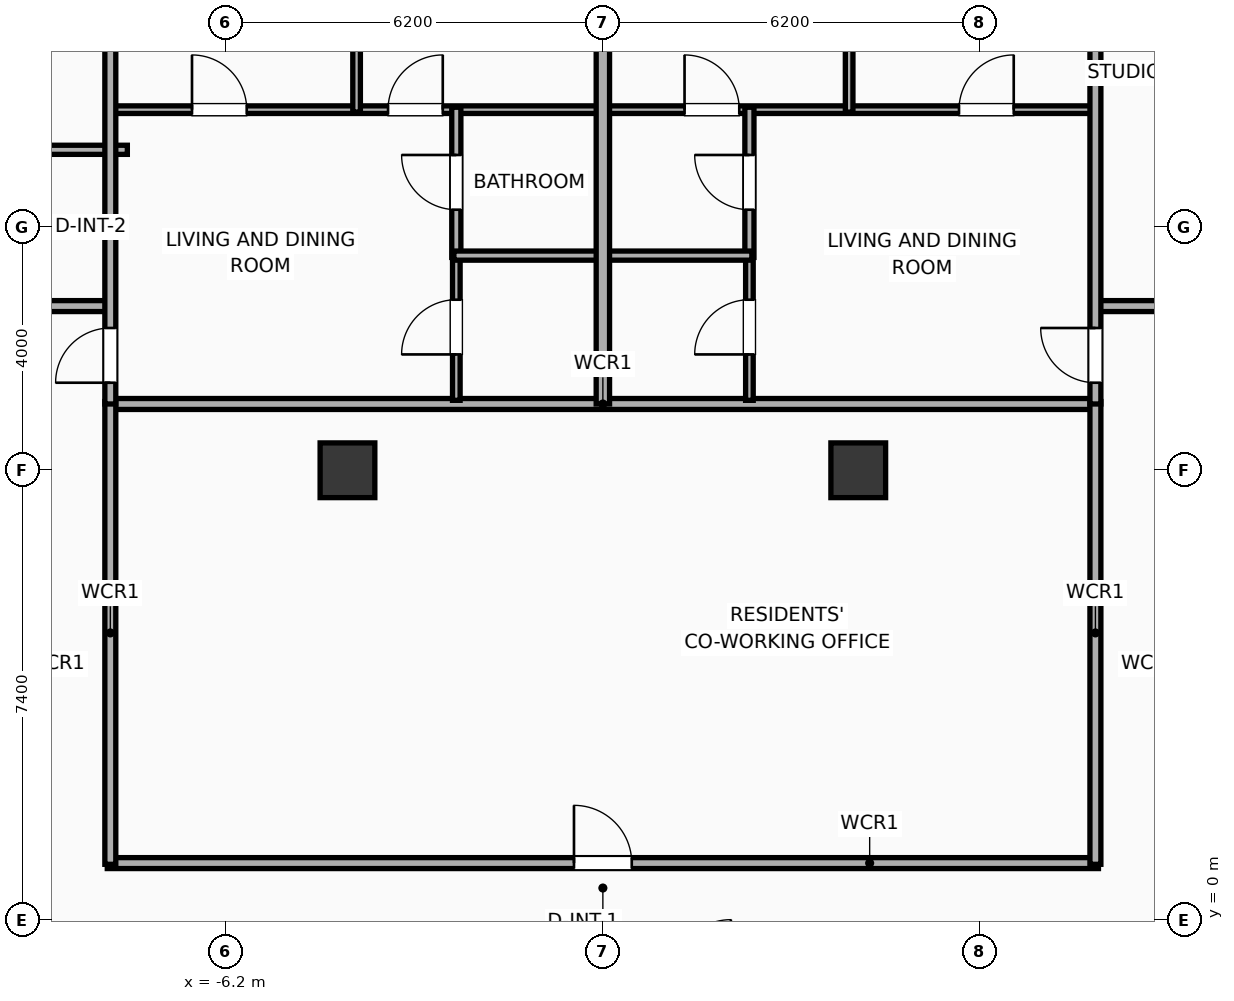
"""IFC4 building model, lengths in metres.
Left out: names, types, materials, properties, quantities, classifications, styles, units other than length and angle.
Written with IfcOpenShell. Run it as: python <this file> out.ifc"""

import sys

from ifc_helpers import new_model, si_unit, direction, frame, frame_2d, origin, origin_2d, place, context, subcontext, project, spatial, rectangle, extrude, element, fill, save


model = new_model("IFC4")
c1 = context("Model", 3, precision=1e-05, world=origin(), true_north=direction((0.0, 1.0)))
c2 = subcontext(c1, "Body", "Model", "MODEL_VIEW")
j1 = project(units=[si_unit("LENGTHUNIT", "METRE"), si_unit("PLANEANGLEUNIT", "RADIAN")], contexts=[c1])
p1 = place(None, origin())
s1 = spatial("IfcSite", under=j1, at=p1, CompositionType="ELEMENT")
p2 = place(p1, origin())
s2 = spatial("IfcBuilding", under=s1, at=p2, CompositionType="ELEMENT")
p3 = place(p2, frame((0.0, 0.0, 200.2)))
s3 = spatial("IfcBuildingStorey", under=s2, at=p3, CompositionType="ELEMENT", Elevation=200.2)
for number, where, z_axis, x_axis in (
    (1, (-4.2, 7.4, 0.0), (0.0, 0.0, 1.0), (1.0, 0.0, 0.0)),
    (2, (4.2, 7.4, 0.0), (0.0, 0.0, 1.0), (1.0, 0.0, 0.0)),
):
    element("IfcColumn", number, at=place(p3, frame(where, z_axis=z_axis, x_axis=x_axis)), inside=s3, PredefinedType="COLUMN", context=c2, shape_type="SweptSolid", body=[
        extrude(rectangle(XDim=0.9, YDim=0.9, at=origin_2d()), origin(), (0.0, 0.0, 1.0), 3.9),
    ])
p4 = place(p3, frame((-8.15, 8.49, 0.0), z_axis=(0.0, 0.0, 1.0), x_axis=(1.0, 0.0, 0.0)))
e3 = element("IfcWall", 3, at=p4, inside=s3, PredefinedType="PARTITIONING", context=c2, shape_type="SweptSolid", body=[
    extrude(rectangle(XDim=16.3, YDim=0.18, at=frame_2d((8.15, 0.0))), origin(), (0.0, 0.0, 1.0), 3.65),
])
p5 = place(p3, frame((-8.15, 0.94, 0.0), z_axis=(0.0, 0.0, 1.0), x_axis=(1.0, 0.0, 0.0)))
e4 = element("IfcWall", 4, at=p5, inside=s3, PredefinedType="PARTITIONING", context=c2, shape_type="SweptSolid", body=[
    extrude(rectangle(XDim=16.3, YDim=0.18, at=frame_2d((8.15, 0.0))), origin(), (0.0, 0.0, 1.0), 3.65),
])
p6 = place(p5, frame((7.675, 0.0, 0.0)))
e5 = element("IfcOpeningElement", 5, at=p6, cuts=e4, PredefinedType="OPENING", context=c2, shape_type="SweptSolid", body=[
    extrude(rectangle(XDim=0.95, YDim=2.05, at=frame_2d((0.475, 1.025))), frame((0.0, 0.1, 0.0), z_axis=(0.0, -1.0, 0.0), x_axis=(1.0, 0.0, 0.0)), (0.0, 0.0, 1.0), 0.2),
])
for number, where, z_axis, x_axis in (
    (6, (-8.1, 0.92, 0.0), (0.0, 0.0, 1.0), (0.0, 1.0, 0.0)),
    (7, (8.1, 0.92, 0.0), (0.0, 0.0, 1.0), (0.0, 1.0, 0.0)),
):
    element("IfcWall", number, at=place(p3, frame(where, z_axis=z_axis, x_axis=x_axis)), inside=s3, PredefinedType="PARTITIONING", context=c2, shape_type="SweptSolid", body=[
        extrude(rectangle(XDim=7.61, YDim=0.18, at=frame_2d((3.805, 0.0))), origin(), (0.0, 0.0, 1.0), 3.65),
    ])
p7 = place(p3, frame((-10.084, 12.67, 0.0), z_axis=(0.0, 0.0, 1.0), x_axis=(1.0, 0.0, 0.0)))
e8 = element("IfcWall", 8, at=p7, inside=s3, PredefinedType="PLUMBINGWALL", context=c2, shape_type="SweptSolid", body=[
    extrude(rectangle(XDim=2.264, YDim=0.15, at=frame_2d((1.132, 0.0))), origin(), (0.0, 0.0, 1.0), 3.65),
])
p8 = place(p3, frame((-19.5, 10.1, 0.0), z_axis=(0.0, 0.0, 1.0), x_axis=(1.0, 0.0, 0.0)))
e9 = element("IfcWall", 9, at=p8, inside=s3, PredefinedType="PARTITIONING", context=c2, shape_type="SweptSolid", body=[
    extrude(rectangle(XDim=11.42, YDim=0.18, at=frame_2d((5.71, 0.0))), origin(), (0.0, 0.0, 1.0), 3.65),
])
p9 = place(p8, frame((3.464, 0.0, 0.0)))
e10 = element("IfcOpeningElement", 10, at=p9, cuts=e9, PredefinedType="OPENING", context=c2, shape_type="SweptSolid", body=[
    extrude(rectangle(XDim=1.15, YDim=2.05, at=frame_2d((0.575, 1.025))), frame((0.0, 0.1, 0.0), z_axis=(0.0, -1.0, 0.0), x_axis=(1.0, 0.0, 0.0)), (0.0, 0.0, 1.0), 0.2),
])
p10 = place(p8, frame((8.323, 0.0, 0.0)))
e11 = element("IfcOpeningElement", 11, at=p10, cuts=e9, PredefinedType="OPENING", context=c2, shape_type="SweptSolid", body=[
    extrude(rectangle(XDim=0.9, YDim=2.05, at=frame_2d((0.45, 1.025))), frame((0.0, 0.1, 0.0), z_axis=(0.0, -1.0, 0.0), x_axis=(1.0, 0.0, 0.0)), (0.0, 0.0, 1.0), 0.2),
])
p11 = place(p3, frame((8.08, 10.1, 0.0), z_axis=(0.0, 0.0, 1.0), x_axis=(1.0, 0.0, 0.0)))
e12 = element("IfcWall", 12, at=p11, inside=s3, PredefinedType="PARTITIONING", context=c2, shape_type="SweptSolid", body=[
    extrude(rectangle(XDim=11.42, YDim=0.18, at=frame_2d((5.71, 0.0))), origin(), (0.0, 0.0, 1.0), 3.65),
])
p12 = place(p11, frame((1.081, 0.0, 0.0)))
e13 = element("IfcOpeningElement", 13, at=p12, cuts=e12, PredefinedType="OPENING", context=c2, shape_type="SweptSolid", body=[
    extrude(rectangle(XDim=1.15, YDim=2.05, at=frame_2d((0.575, 1.025))), frame((0.0, 0.1, 0.0), z_axis=(0.0, -1.0, 0.0), x_axis=(1.0, 0.0, 0.0)), (0.0, 0.0, 1.0), 0.2),
])
p13 = place(p11, frame((8.243, 0.0, 0.0)))
e14 = element("IfcOpeningElement", 14, at=p13, cuts=e12, PredefinedType="OPENING", context=c2, shape_type="SweptSolid", body=[
    extrude(rectangle(XDim=0.9, YDim=2.05, at=frame_2d((0.45, 1.025))), frame((0.0, 0.1, 0.0), z_axis=(0.0, -1.0, 0.0), x_axis=(1.0, 0.0, 0.0)), (0.0, 0.0, 1.0), 0.2),
])
p14 = place(p3, frame((-8.08, 13.33, 0.0), z_axis=(0.0, 0.0, 1.0), x_axis=(1.0, 0.0, 0.0)))
e15 = element("IfcWall", 15, at=p14, inside=s3, PredefinedType="PARTITIONING", context=c2, shape_type="SweptSolid", body=[
    extrude(rectangle(XDim=8.06, YDim=0.125, at=frame_2d((4.03, 0.0))), origin(), (0.0, 0.0, 1.0), 3.65),
])
p15 = place(p14, frame((1.323, 0.0, 0.0)))
e16 = element("IfcOpeningElement", 16, at=p15, cuts=e15, PredefinedType="OPENING", context=c2, shape_type="SweptSolid", body=[
    extrude(rectangle(XDim=0.9, YDim=2.05, at=frame_2d((0.45, 1.025))), frame((0.0, 0.073, 0.0), z_axis=(0.0, -1.0, 0.0), x_axis=(1.0, 0.0, 0.0)), (0.0, 0.0, 1.0), 0.145),
])
p16 = place(p14, frame((4.547, 0.0, 0.0)))
e17 = element("IfcOpeningElement", 17, at=p16, cuts=e15, PredefinedType="OPENING", context=c2, shape_type="SweptSolid", body=[
    extrude(rectangle(XDim=0.9, YDim=2.05, at=frame_2d((0.45, 1.025))), frame((0.0, 0.073, 0.0), z_axis=(0.0, -1.0, 0.0), x_axis=(1.0, 0.0, 0.0)), (0.0, 0.0, 1.0), 0.145),
])
p17 = place(p3, frame((-2.41, 8.55, 0.0), z_axis=(0.0, 0.0, 1.0), x_axis=(0.0, 1.0, 0.0)))
e18 = element("IfcWall", 18, at=p17, inside=s3, PredefinedType="PARTITIONING", context=c2, shape_type="SweptSolid", body=[
    extrude(rectangle(XDim=2.41, YDim=0.125, at=frame_2d((1.205, 0.0))), origin(), (0.0, 0.0, 1.0), 3.65),
])
p18 = place(p17, frame((0.755, 0.0, 0.0)))
e19 = element("IfcOpeningElement", 19, at=p18, cuts=e18, PredefinedType="OPENING", context=c2, shape_type="SweptSolid", body=[
    extrude(rectangle(XDim=0.9, YDim=2.05, at=frame_2d((0.45, 1.025))), frame((0.0, 0.073, 0.0), z_axis=(0.0, -1.0, 0.0), x_axis=(1.0, 0.0, 0.0)), (0.0, 0.0, 1.0), 0.145),
])
p19 = place(p3, frame((-2.41, 10.9, 0.0), z_axis=(0.0, 0.0, 1.0), x_axis=(0.0, 1.0, 0.0)))
e20 = element("IfcWall", 20, at=p19, inside=s3, PredefinedType="PLUMBINGWALL", context=c2, shape_type="SweptSolid", body=[
    extrude(rectangle(XDim=2.47, YDim=0.15, at=frame_2d((1.235, 0.0))), origin(), (0.0, 0.0, 1.0), 3.65),
])
p20 = place(p19, frame((0.785, 0.0, 0.0)))
e21 = element("IfcOpeningElement", 21, at=p20, cuts=e20, PredefinedType="OPENING", context=c2, shape_type="SweptSolid", body=[
    extrude(rectangle(XDim=0.9, YDim=2.05, at=frame_2d((0.45, 1.025))), frame((0.0, 0.085, 0.0), z_axis=(0.0, -1.0, 0.0), x_axis=(1.0, 0.0, 0.0)), (0.0, 0.0, 1.0), 0.17),
])
p21 = place(p3, frame((-2.45, 10.93, 0.0), z_axis=(0.0, 0.0, 1.0), x_axis=(1.0, 0.0, 0.0)))
e22 = element("IfcWall", 22, at=p21, inside=s3, PredefinedType="PLUMBINGWALL", context=c2, shape_type="SweptSolid", body=[
    extrude(rectangle(XDim=2.43, YDim=0.15, at=frame_2d((1.215, 0.0))), origin(), (0.0, 0.0, 1.0), 3.65),
])
p22 = place(p3, frame((-4.05, 13.29, 0.0), z_axis=(0.0, 0.0, 1.0), x_axis=(0.0, 1.0, 0.0)))
e23 = element("IfcWall", 23, at=p22, inside=s3, PredefinedType="PARTITIONING", context=c2, shape_type="SweptSolid", body=[
    extrude(rectangle(XDim=6.74, YDim=0.125, at=frame_2d((3.37, 0.0))), origin(), (0.0, 0.0, 1.0), 2.54),
])
p23 = place(p3, frame((-8.1, 8.49, 0.0), z_axis=(0.0, 0.0, 1.0), x_axis=(0.0, 1.0, 0.0)))
e24 = element("IfcWall", 24, at=p23, inside=s3, PredefinedType="PARTITIONING", context=c2, shape_type="SweptSolid", body=[
    extrude(rectangle(XDim=11.54, YDim=0.18, at=frame_2d((5.77, 0.0))), origin(), (0.0, 0.0, 1.0), 3.65),
])
p24 = place(p23, frame((0.35, 0.0, 0.0)))
e25 = element("IfcOpeningElement", 25, at=p24, cuts=e24, PredefinedType="OPENING", context=c2, shape_type="SweptSolid", body=[
    extrude(rectangle(XDim=0.9, YDim=2.05, at=frame_2d((0.45, 1.025))), frame((0.0, 0.1, 0.0), z_axis=(0.0, -1.0, 0.0), x_axis=(1.0, 0.0, 0.0)), (0.0, 0.0, 1.0), 0.2),
])
p25 = place(p3, frame((0.02, 13.33, 0.0), z_axis=(0.0, 0.0, 1.0), x_axis=(1.0, 0.0, 0.0)))
e26 = element("IfcWall", 26, at=p25, inside=s3, PredefinedType="PARTITIONING", context=c2, shape_type="SweptSolid", body=[
    extrude(rectangle(XDim=8.06, YDim=0.125, at=frame_2d((4.03, 0.0))), origin(), (0.0, 0.0, 1.0), 3.65),
])
p26 = place(p25, frame((1.323, 0.0, 0.0)))
e27 = element("IfcOpeningElement", 27, at=p26, cuts=e26, PredefinedType="OPENING", context=c2, shape_type="SweptSolid", body=[
    extrude(rectangle(XDim=0.9, YDim=2.05, at=frame_2d((0.45, 1.025))), frame((0.0, 0.073, 0.0), z_axis=(0.0, -1.0, 0.0), x_axis=(1.0, 0.0, 0.0)), (0.0, 0.0, 1.0), 0.145),
])
p27 = place(p25, frame((5.837, 0.0, 0.0)))
e28 = element("IfcOpeningElement", 28, at=p27, cuts=e26, PredefinedType="OPENING", context=c2, shape_type="SweptSolid", body=[
    extrude(rectangle(XDim=0.9, YDim=2.05, at=frame_2d((0.45, 1.025))), frame((0.0, 0.073, 0.0), z_axis=(0.0, -1.0, 0.0), x_axis=(1.0, 0.0, 0.0)), (0.0, 0.0, 1.0), 0.145),
])
p28 = place(p3, frame((2.41, 8.55, 0.0), z_axis=(0.0, 0.0, 1.0), x_axis=(0.0, 1.0, 0.0)))
e29 = element("IfcWall", 29, at=p28, inside=s3, PredefinedType="PARTITIONING", context=c2, shape_type="SweptSolid", body=[
    extrude(rectangle(XDim=2.41, YDim=0.125, at=frame_2d((1.205, 0.0))), origin(), (0.0, 0.0, 1.0), 3.65),
])
p29 = place(p28, frame((0.755, 0.0, 0.0)))
e30 = element("IfcOpeningElement", 30, at=p29, cuts=e29, PredefinedType="OPENING", context=c2, shape_type="SweptSolid", body=[
    extrude(rectangle(XDim=0.9, YDim=2.05, at=frame_2d((0.45, 1.025))), frame((0.0, 0.073, 0.0), z_axis=(0.0, -1.0, 0.0), x_axis=(1.0, 0.0, 0.0)), (0.0, 0.0, 1.0), 0.145),
])
p30 = place(p3, frame((2.41, 10.9, 0.0), z_axis=(0.0, 0.0, 1.0), x_axis=(0.0, 1.0, 0.0)))
e31 = element("IfcWall", 31, at=p30, inside=s3, PredefinedType="PLUMBINGWALL", context=c2, shape_type="SweptSolid", body=[
    extrude(rectangle(XDim=2.47, YDim=0.15, at=frame_2d((1.235, 0.0))), origin(), (0.0, 0.0, 1.0), 3.65),
])
p31 = place(p30, frame((0.785, 0.0, 0.0)))
e32 = element("IfcOpeningElement", 32, at=p31, cuts=e31, PredefinedType="OPENING", context=c2, shape_type="SweptSolid", body=[
    extrude(rectangle(XDim=0.9, YDim=2.05, at=frame_2d((0.45, 1.025))), frame((0.0, 0.085, 0.0), z_axis=(0.0, -1.0, 0.0), x_axis=(1.0, 0.0, 0.0)), (0.0, 0.0, 1.0), 0.17),
])
p32 = place(p3, frame((0.02, 10.93, 0.0), z_axis=(0.0, 0.0, 1.0), x_axis=(1.0, 0.0, 0.0)))
e33 = element("IfcWall", 33, at=p32, inside=s3, PredefinedType="PLUMBINGWALL", context=c2, shape_type="SweptSolid", body=[
    extrude(rectangle(XDim=2.43, YDim=0.15, at=frame_2d((1.215, 0.0))), origin(), (0.0, 0.0, 1.0), 3.65),
])
p33 = place(p3, frame((4.05, 13.29, 0.0), z_axis=(0.0, 0.0, 1.0), x_axis=(0.0, 1.0, 0.0)))
e34 = element("IfcWall", 34, at=p33, inside=s3, PredefinedType="PARTITIONING", context=c2, shape_type="SweptSolid", body=[
    extrude(rectangle(XDim=6.74, YDim=0.125, at=frame_2d((3.37, 0.0))), origin(), (0.0, 0.0, 1.0), 3.65),
])
p34 = place(p3, frame((8.1, 8.49, 0.0), z_axis=(0.0, 0.0, 1.0), x_axis=(0.0, 1.0, 0.0)))
e35 = element("IfcWall", 35, at=p34, inside=s3, PredefinedType="PARTITIONING", context=c2, shape_type="SweptSolid", body=[
    extrude(rectangle(XDim=11.54, YDim=0.18, at=frame_2d((5.77, 0.0))), origin(), (0.0, 0.0, 1.0), 3.65),
])
p35 = place(p34, frame((0.35, 0.0, 0.0)))
e36 = element("IfcOpeningElement", 36, at=p35, cuts=e35, PredefinedType="OPENING", context=c2, shape_type="SweptSolid", body=[
    extrude(rectangle(XDim=0.9, YDim=2.05, at=frame_2d((0.45, 1.025))), frame((0.0, 0.1, 0.0), z_axis=(0.0, -1.0, 0.0), x_axis=(1.0, 0.0, 0.0)), (0.0, 0.0, 1.0), 0.2),
])
p36 = place(p3, frame((0.0, 8.49, 0.0), z_axis=(0.0, 0.0, 1.0), x_axis=(0.0, 1.0, 0.0)))
e37 = element("IfcWall", 37, at=p36, inside=s3, PredefinedType="PARTITIONING", context=c2, shape_type="SweptSolid", body=[
    extrude(rectangle(XDim=11.54, YDim=0.22, at=frame_2d((5.77, 0.0))), origin(), (0.0, 0.0, 1.0), 3.65),
])
p37 = place(p6, origin())
e38 = element("IfcDoor", 38, at=p37, inside=s3, OperationType="SINGLE_SWING_LEFT", PredefinedType="DOOR", context=c2, shape_type="SweptSolid", body=[
    extrude(rectangle(XDim=0.95, YDim=2.05, at=frame_2d((0.475, 1.025))), frame((0.0, 0.025, 0.0), z_axis=(0.0, -1.0, 0.0), x_axis=(1.0, 0.0, 0.0)), (0.0, 0.0, 1.0), 0.05),
])
fill(e5, e38)
p38 = place(p15, origin())
e39 = element("IfcDoor", 39, at=p38, inside=s3, OperationType="SINGLE_SWING_LEFT", PredefinedType="DOOR", context=c2, shape_type="SweptSolid", body=[
    extrude(rectangle(XDim=0.9, YDim=2.05, at=frame_2d((0.45, 1.025))), frame((0.0, 0.025, 0.0), z_axis=(0.0, -1.0, 0.0), x_axis=(1.0, 0.0, 0.0)), (0.0, 0.0, 1.0), 0.05),
])
fill(e16, e39)
p39 = place(p16, origin())
e40 = element("IfcDoor", 40, at=p39, inside=s3, OperationType="SINGLE_SWING_RIGHT", PredefinedType="DOOR", context=c2, shape_type="SweptSolid", body=[
    extrude(rectangle(XDim=0.9, YDim=2.05, at=frame_2d((0.45, 1.025))), frame((0.0, 0.025, 0.0), z_axis=(0.0, -1.0, 0.0), x_axis=(1.0, 0.0, 0.0)), (0.0, 0.0, 1.0), 0.05),
])
fill(e17, e40)
p40 = place(p18, origin())
e41 = element("IfcDoor", 41, at=p40, inside=s3, OperationType="SINGLE_SWING_LEFT", PredefinedType="DOOR", context=c2, shape_type="SweptSolid", body=[
    extrude(rectangle(XDim=0.9, YDim=2.05, at=frame_2d((0.45, 1.025))), frame((0.0, 0.025, 0.0), z_axis=(0.0, -1.0, 0.0), x_axis=(1.0, 0.0, 0.0)), (0.0, 0.0, 1.0), 0.05),
])
fill(e19, e41)
p41 = place(p20, origin())
e42 = element("IfcDoor", 42, at=p41, inside=s3, OperationType="SINGLE_SWING_RIGHT", PredefinedType="DOOR", context=c2, shape_type="SweptSolid", body=[
    extrude(rectangle(XDim=0.9, YDim=2.05, at=frame_2d((0.45, 1.025))), frame((0.0, 0.025, 0.0), z_axis=(0.0, -1.0, 0.0), x_axis=(1.0, 0.0, 0.0)), (0.0, 0.0, 1.0), 0.05),
])
fill(e21, e42)
p42 = place(p24, origin())
e43 = element("IfcDoor", 43, at=p42, inside=s3, OperationType="SINGLE_SWING_LEFT", PredefinedType="DOOR", context=c2, shape_type="SweptSolid", body=[
    extrude(rectangle(XDim=0.9, YDim=2.05, at=frame_2d((0.45, 1.025))), frame((0.0, 0.025, 0.0), z_axis=(0.0, -1.0, 0.0), x_axis=(1.0, 0.0, 0.0)), (0.0, 0.0, 1.0), 0.05),
])
fill(e25, e43)
p43 = place(p26, origin())
e44 = element("IfcDoor", 44, at=p43, inside=s3, OperationType="SINGLE_SWING_LEFT", PredefinedType="DOOR", context=c2, shape_type="SweptSolid", body=[
    extrude(rectangle(XDim=0.9, YDim=2.05, at=frame_2d((0.45, 1.025))), frame((0.0, 0.025, 0.0), z_axis=(0.0, -1.0, 0.0), x_axis=(1.0, 0.0, 0.0)), (0.0, 0.0, 1.0), 0.05),
])
fill(e27, e44)
p44 = place(p27, origin())
e45 = element("IfcDoor", 45, at=p44, inside=s3, OperationType="SINGLE_SWING_RIGHT", PredefinedType="DOOR", context=c2, shape_type="SweptSolid", body=[
    extrude(rectangle(XDim=0.9, YDim=2.05, at=frame_2d((0.45, 1.025))), frame((0.0, 0.025, 0.0), z_axis=(0.0, -1.0, 0.0), x_axis=(1.0, 0.0, 0.0)), (0.0, 0.0, 1.0), 0.05),
])
fill(e28, e45)
p45 = place(p29, origin())
e46 = element("IfcDoor", 46, at=p45, inside=s3, OperationType="SINGLE_SWING_LEFT", PredefinedType="DOOR", context=c2, shape_type="SweptSolid", body=[
    extrude(rectangle(XDim=0.9, YDim=2.05, at=frame_2d((0.45, 1.025))), frame((0.0, 0.025, 0.0), z_axis=(0.0, -1.0, 0.0), x_axis=(1.0, 0.0, 0.0)), (0.0, 0.0, 1.0), 0.05),
])
fill(e30, e46)
p46 = place(p31, origin())
e47 = element("IfcDoor", 47, at=p46, inside=s3, OperationType="SINGLE_SWING_RIGHT", PredefinedType="DOOR", context=c2, shape_type="SweptSolid", body=[
    extrude(rectangle(XDim=0.9, YDim=2.05, at=frame_2d((0.45, 1.025))), frame((0.0, 0.025, 0.0), z_axis=(0.0, -1.0, 0.0), x_axis=(1.0, 0.0, 0.0)), (0.0, 0.0, 1.0), 0.05),
])
fill(e32, e47)
p47 = place(p35, origin())
e48 = element("IfcDoor", 48, at=p47, inside=s3, OperationType="SINGLE_SWING_RIGHT", PredefinedType="DOOR", context=c2, shape_type="SweptSolid", body=[
    extrude(rectangle(XDim=0.9, YDim=2.05, at=frame_2d((0.45, 1.025))), frame((0.0, 0.025, 0.0), z_axis=(0.0, -1.0, 0.0), x_axis=(1.0, 0.0, 0.0)), (0.0, 0.0, 1.0), 0.05),
])
fill(e36, e48)
save(model, sys.argv[1])
